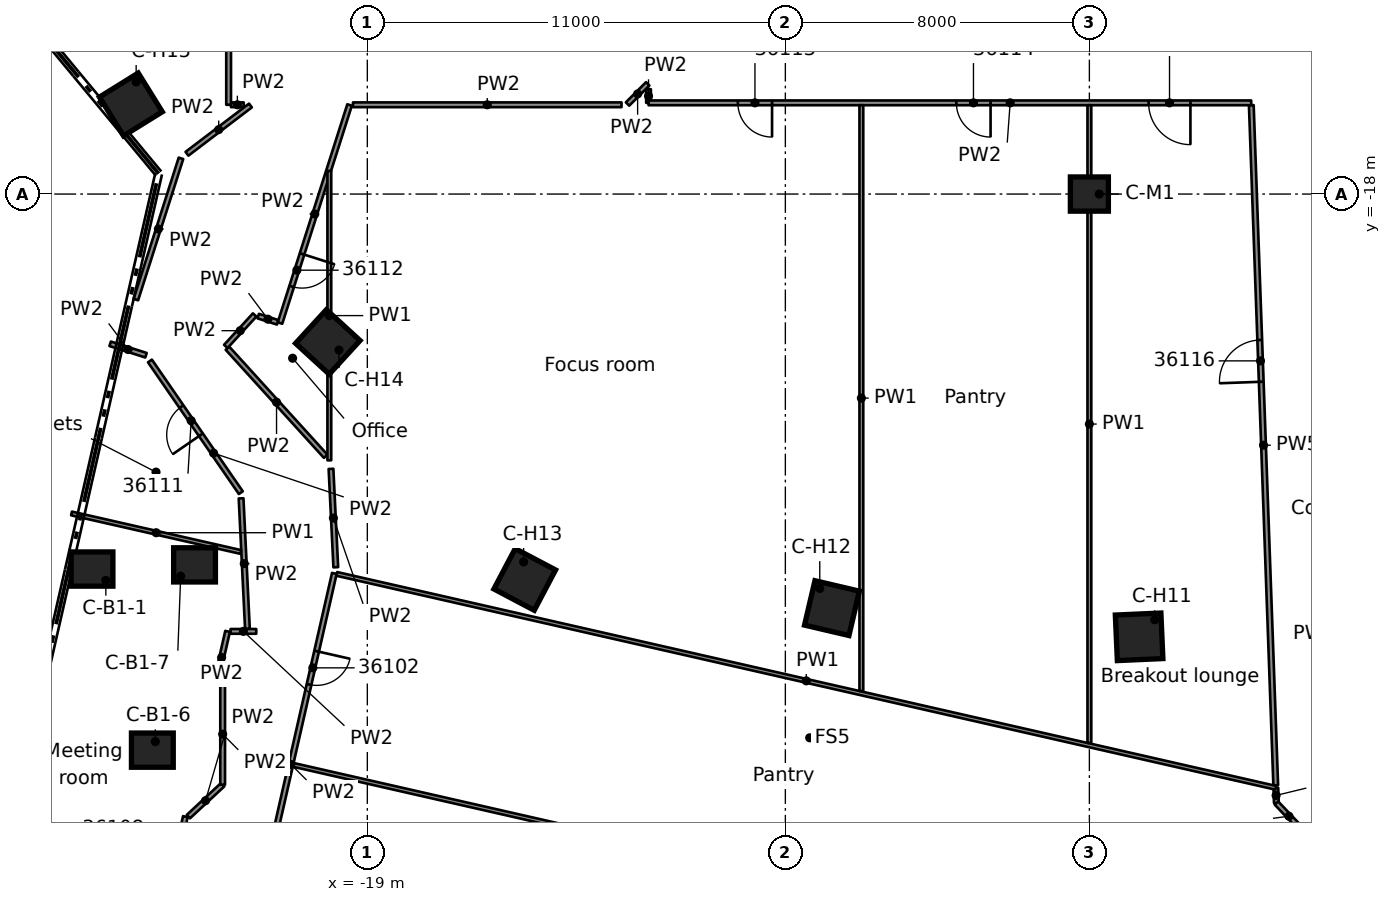
"""IFC4 building model, lengths in metres.
Left out: names, types, materials, properties, quantities, classifications, styles, units other than length and angle.
Written with IfcOpenShell. Run it as: python <this file> out.ifc"""

import sys

from ifc_helpers import new_model, si_unit, direction, frame, frame_2d, origin, origin_2d, place, context, subcontext, project, spatial, rectangle, extrude, element, fill, save


model = new_model("IFC4")
c1 = context("Model", 3, precision=1e-05, world=origin(), true_north=direction((0.0, 1.0)))
c2 = subcontext(c1, "Body", "Model", "MODEL_VIEW")
j1 = project(units=[si_unit("LENGTHUNIT", "METRE"), si_unit("PLANEANGLEUNIT", "RADIAN")], contexts=[c1])
p1 = place(None, origin())
s1 = spatial("IfcSite", under=j1, at=p1, CompositionType="ELEMENT")
p2 = place(p1, origin())
s2 = spatial("IfcBuilding", under=s1, at=p2, CompositionType="ELEMENT")
p3 = place(p2, frame((0.0, 0.0, 181.1)))
s3 = spatial("IfcBuildingStorey", under=s2, at=p3, CompositionType="ELEMENT", Elevation=181.1)
for number, where, z_axis, x_axis in (
    (1, (-26.245, -27.867, 0.0), (0.0, 0.0, 1.0), (1.0, 0.0, 0.0)),
    (2, (-24.657, -32.632, 0.0), (0.0, 0.0, 1.0), (1.0, 0.0, 0.0)),
    (3, (-23.547, -27.757, 0.0), (0.0, 0.0, 1.0), (1.0, 0.0, 0.0)),
):
    element("IfcColumn", number, at=place(p3, frame(where, z_axis=z_axis, x_axis=x_axis)), inside=s3, PredefinedType="COLUMN", context=c2, shape_type="SweptSolid", body=[
        extrude(rectangle(XDim=1.1, YDim=0.9, at=origin_2d()), origin(), (0.0, 0.0, 1.0), 3.5),
    ])
for number, where, z_axis, x_axis in (
    (4, (1.309, -29.65, 0.0), (0.0, 0.0, 1.0), (0.044, -0.999, 0.0)),
    (5, (-6.774, -28.895, 0.0), (0.0, 0.0, 1.0), (-0.228, -0.974, 0.0)),
    (6, (-14.858, -28.141, 0.0), (0.0, 0.0, 1.0), (-0.467, -0.884, 0.0)),
    (7, (-20.04, -21.891, 0.0), (0.0, 0.0, 1.0), (-0.675, -0.738, 0.0)),
    (8, (-25.222, -15.642, 0.0), (0.0, 0.0, 1.0), (-0.85, -0.527, 0.0)),
):
    element("IfcColumn", number, at=place(p3, frame(where, z_axis=z_axis, x_axis=x_axis)), inside=s3, PredefinedType="COLUMN", context=c2, shape_type="SweptSolid", body=[
        extrude(rectangle(XDim=1.2, YDim=1.2, at=origin_2d()), origin(), (0.0, 0.0, 1.0), 3.5),
    ])
p4 = place(p3, frame((0.0, -18.0, 0.0), z_axis=(0.0, 0.0, 1.0), x_axis=(1.0, 0.0, 0.0)))
e9 = element("IfcColumn", 9, at=p4, inside=s3, PredefinedType="COLUMN", context=c2, shape_type="SweptSolid", body=[
    extrude(rectangle(XDim=1.0, YDim=0.9, at=origin_2d()), origin(), (0.0, 0.0, 1.0), 3.5),
])
p5 = place(p3, frame((-11.601, -15.242, 0.0), z_axis=(0.0, 0.0, 1.0), x_axis=(0.002726642898, -0.999996282702, 0.0)))
e10 = element("IfcWall", 10, at=p5, inside=s3, PredefinedType="PARTITIONING", context=c2, shape_type="SweptSolid", body=[
    extrude(rectangle(XDim=0.358, YDim=0.125, at=frame_2d((0.179, 0.0))), origin(), (0.0, 0.0, 1.0), 3.06),
])
p6 = place(p3, frame((4.907, -33.623, 0.0), z_axis=(0.0, 0.0, 1.0), x_axis=(0.034692866757, -0.999398021309, 0.0)))
e11 = element("IfcWall", 11, at=p6, inside=s3, PredefinedType="PARTITIONING", context=c2, shape_type="SweptSolid", body=[
    extrude(rectangle(XDim=0.401, YDim=0.125, at=frame_2d((0.201, 0.0))), origin(), (0.0, 0.0, 1.0), 3.06),
])
p7 = place(p3, frame((4.904, -33.555, 0.0), z_axis=(0.0, 0.0, 1.0), x_axis=(-0.035916720211, 0.999354786454, 0.0)))
e12 = element("IfcWall", 12, at=p7, inside=s3, PredefinedType="PARTITIONING", context=c2, shape_type="SweptSolid", body=[
    extrude(rectangle(XDim=17.904, YDim=0.125, at=frame_2d((8.952, 0.0))), origin(), (0.0, 0.0, 1.0), 2.425),
])
p8 = place(p7, frame((10.623, 0.0, 0.0)))
e13 = element("IfcOpeningElement", 13, at=p8, cuts=e12, PredefinedType="OPENING", context=c2, shape_type="SweptSolid", body=[
    extrude(rectangle(XDim=1.1, YDim=2.1, at=frame_2d((0.55, 1.05))), frame((0.0, 0.073, 0.0), z_axis=(0.0, -1.0, 0.0), x_axis=(1.0, 0.0, 0.0)), (0.0, 0.0, 1.0), 0.145),
])
p9 = place(p3, frame((-22.322, -26.007, 0.0), z_axis=(0.0, 0.0, 1.0), x_axis=(0.048573949442, -0.998819589033, 0.0)))
e14 = element("IfcWall", 14, at=p9, inside=s3, PredefinedType="PARTITIONING", context=c2, shape_type="SweptSolid", body=[
    extrude(rectangle(XDim=3.438, YDim=0.125, at=frame_2d((1.719, 0.0))), origin(), (0.0, 0.0, 1.0), 3.06),
])
p10 = place(p3, frame((-19.956, -25.231, 0.0), z_axis=(0.0, 0.0, 1.0), x_axis=(0.048617095064, -0.998817489869, 0.0)))
e15 = element("IfcWall", 15, at=p10, inside=s3, PredefinedType="PARTITIONING", context=c2, shape_type="SweptSolid", body=[
    extrude(rectangle(XDim=2.591, YDim=0.125, at=frame_2d((1.296, 0.0))), origin(), (0.0, 0.0, 1.0), 3.06),
])
p11 = place(p3, frame((-22.329, -25.857, 0.0), z_axis=(0.0, 0.0, 1.0), x_axis=(-0.567945710046, 0.823066018276, 0.0)))
e16 = element("IfcWall", 16, at=p11, inside=s3, PredefinedType="PARTITIONING", context=c2, shape_type="SweptSolid", body=[
    extrude(rectangle(XDim=4.21, YDim=0.125, at=frame_2d((2.105, 0.0))), origin(), (0.0, 0.0, 1.0), 3.06),
])
p12 = place(p11, frame((1.85, 0.0, 0.0)))
e17 = element("IfcOpeningElement", 17, at=p12, cuts=e16, PredefinedType="OPENING", context=c2, shape_type="SweptSolid", body=[
    extrude(rectangle(XDim=0.9, YDim=2.1, at=frame_2d((0.45, 1.05))), frame((0.0, 0.073, 0.0), z_axis=(0.0, -1.0, 0.0), x_axis=(1.0, 0.0, 0.0)), (0.0, 0.0, 1.0), 0.145),
])
p13 = place(p3, frame((-20.096, -24.9, 0.0), z_axis=(0.0, 0.0, 1.0), x_axis=(-0.672615898584, 0.739991792503, 0.0)))
e18 = element("IfcWall", 18, at=p13, inside=s3, PredefinedType="PARTITIONING", context=c2, shape_type="SweptSolid", body=[
    extrude(rectangle(XDim=3.844, YDim=0.125, at=frame_2d((1.922, 0.0))), origin(), (0.0, 0.0, 1.0), 3.06),
])
p14 = place(p3, frame((-25.767, -21.94, 0.0), z_axis=(0.0, 0.0, 1.0), x_axis=(0.952650092138, -0.304068745433, 0.0)))
e19 = element("IfcWall", 19, at=p14, inside=s3, PredefinedType="PARTITIONING", context=c2, shape_type="SweptSolid", body=[
    extrude(rectangle(XDim=0.99, YDim=0.125, at=frame_2d((0.495, 0.0))), origin(), (0.0, 0.0, 1.0), 3.06),
])
p15 = place(p3, frame((-21.872, -21.211, 0.0), z_axis=(0.0, 0.0, 1.0), x_axis=(0.952508294333, -0.304512642146, 0.0)))
e20 = element("IfcWall", 20, at=p15, inside=s3, PredefinedType="PARTITIONING", context=c2, shape_type="SweptSolid", body=[
    extrude(rectangle(XDim=0.539, YDim=0.125, at=frame_2d((0.27, 0.0))), origin(), (0.0, 0.0, 1.0), 3.06),
])
p16 = place(p3, frame((-20.951, -33.019, 0.0), z_axis=(0.0, 0.0, 1.0), x_axis=(0.975025683381, -0.222092135715, 0.0)))
e21 = element("IfcWall", 21, at=p16, inside=s3, PredefinedType="PARTITIONING", context=c2, shape_type="SweptSolid", body=[
    extrude(rectangle(XDim=26.187, YDim=0.1, at=frame_2d((13.094, 0.0))), origin(), (0.0, 0.0, 1.0), 3.06),
])
p17 = place(p3, frame((-26.784, -26.404, 0.0), z_axis=(0.0, 0.0, 1.0), x_axis=(0.975064044209, -0.221923657346, 0.0)))
e22 = element("IfcWall", 22, at=p17, inside=s3, PredefinedType="PARTITIONING", context=c2, shape_type="SweptSolid", body=[
    extrude(rectangle(XDim=4.569, YDim=0.1, at=frame_2d((2.284, 0.0))), origin(), (0.0, 0.0, 1.0), 3.06),
])
p18 = place(p3, frame((-19.806, -27.994, 0.0), z_axis=(0.0, 0.0, 1.0), x_axis=(0.975023541408, -0.222101539165, 0.0)))
e23 = element("IfcWall", 23, at=p18, inside=s3, PredefinedType="PARTITIONING", context=c2, shape_type="SweptSolid", body=[
    extrude(rectangle(XDim=25.345, YDim=0.1, at=frame_2d((12.672, 0.0))), origin(), (0.0, 0.0, 1.0), 3.06),
])
p19 = place(p3, frame((-23.709, -34.381, 0.0), z_axis=(0.0, 0.0, 1.0), x_axis=(0.732207421562, 0.681081707147, 0.0)))
e24 = element("IfcWall", 24, at=p19, inside=s3, PredefinedType="PARTITIONING", context=c2, shape_type="SweptSolid", body=[
    extrude(rectangle(XDim=1.232, YDim=0.125, at=frame_2d((0.616, 0.0))), origin(), (0.0, 0.0, 1.0), 3.06),
])
p20 = place(p3, frame((-22.599, -29.507, 0.0), z_axis=(0.0, 0.0, 1.0), x_axis=(1.0, 0.0, 0.0)))
e25 = element("IfcWall", 25, at=p20, inside=s3, PredefinedType="PARTITIONING", context=c2, shape_type="SweptSolid", body=[
    extrude(rectangle(XDim=0.676, YDim=0.125, at=frame_2d((0.338, 0.0))), origin(), (0.0, 0.0, 1.0), 3.06),
])
p21 = place(p3, frame((-22.587, -15.651, 0.0), z_axis=(0.0, 0.0, 1.0), x_axis=(1.0, 0.0, 0.0)))
e26 = element("IfcWall", 26, at=p21, inside=s3, PredefinedType="PARTITIONING", context=c2, shape_type="SweptSolid", body=[
    extrude(rectangle(XDim=0.334, YDim=0.125, at=frame_2d((0.167, 0.0))), origin(), (0.0, 0.0, 1.0), 3.06),
])
p22 = place(p3, frame((-19.378, -15.651, 0.0), z_axis=(0.0, 0.0, 1.0), x_axis=(1.0, 0.0, 0.0)))
e27 = element("IfcWall", 27, at=p22, inside=s3, PredefinedType="PARTITIONING", context=c2, shape_type="SweptSolid", body=[
    extrude(rectangle(XDim=7.067, YDim=0.125, at=frame_2d((3.533, 0.0))), origin(), (0.0, 0.0, 1.0), 3.06),
])
p23 = place(p3, frame((4.259, -15.6, 0.0), z_axis=(0.0, 0.0, 1.0), x_axis=(-1.0, 0.0, 0.0)))
e28 = element("IfcWall", 28, at=p23, inside=s3, PredefinedType="PARTITIONING", context=c2, shape_type="SweptSolid", body=[
    extrude(rectangle(XDim=15.859, YDim=0.125, at=frame_2d((7.93, 0.0))), origin(), (0.0, 0.0, 1.0), 3.06),
])
p24 = place(p23, frame((12.609, 0.0, 0.0)))
e29 = element("IfcOpeningElement", 29, at=p24, cuts=e28, PredefinedType="OPENING", context=c2, shape_type="SweptSolid", body=[
    extrude(rectangle(XDim=0.9, YDim=2.1, at=frame_2d((0.45, 1.05))), frame((0.0, 0.073, 0.0), z_axis=(0.0, -1.0, 0.0), x_axis=(1.0, 0.0, 0.0)), (0.0, 0.0, 1.0), 0.145),
])
p25 = place(p23, frame((6.859, 0.0, 0.0)))
e30 = element("IfcOpeningElement", 30, at=p25, cuts=e28, PredefinedType="OPENING", context=c2, shape_type="SweptSolid", body=[
    extrude(rectangle(XDim=0.9, YDim=2.1, at=frame_2d((0.45, 1.05))), frame((0.0, 0.073, 0.0), z_axis=(0.0, -1.0, 0.0), x_axis=(1.0, 0.0, 0.0)), (0.0, 0.0, 1.0), 0.145),
])
p26 = place(p23, frame((1.6, 0.0, 0.0)))
e31 = element("IfcOpeningElement", 31, at=p26, cuts=e28, PredefinedType="OPENING", context=c2, shape_type="SweptSolid", body=[
    extrude(rectangle(XDim=1.1, YDim=2.1, at=frame_2d((0.55, 1.05))), frame((0.0, 0.073, 0.0), z_axis=(0.0, -1.0, 0.0), x_axis=(1.0, 0.0, 0.0)), (0.0, 0.0, 1.0), 0.145),
])
p27 = place(p3, frame((4.922, -34.024, 0.0), z_axis=(0.0, 0.0, 1.0), x_axis=(0.689011074604, -0.724750811709, 0.0)))
e32 = element("IfcWall", 32, at=p27, inside=s3, PredefinedType="PARTITIONING", context=c2, shape_type="SweptSolid", body=[
    extrude(rectangle(XDim=0.956, YDim=0.125, at=frame_2d((0.478, 0.0))), origin(), (0.0, 0.0, 1.0), 3.06),
])
p28 = place(p3, frame((-23.746, -16.94, 0.0), z_axis=(0.0, 0.0, 1.0), x_axis=(0.796002971308, 0.605292714039, 0.0)))
e33 = element("IfcWall", 33, at=p28, inside=s3, PredefinedType="PARTITIONING", context=c2, shape_type="SweptSolid", body=[
    extrude(rectangle(XDim=2.098, YDim=0.125, at=frame_2d((1.049, 0.0))), origin(), (0.0, 0.0, 1.0), 3.06),
])
p29 = place(p3, frame((-12.153, -15.631, 0.0), z_axis=(0.0, 0.0, 1.0), x_axis=(0.707106781187, 0.707106781187, 0.0)))
e34 = element("IfcWall", 34, at=p29, inside=s3, PredefinedType="PARTITIONING", context=c2, shape_type="SweptSolid", body=[
    extrude(rectangle(XDim=0.751, YDim=0.125, at=frame_2d((0.375, 0.0))), origin(), (0.0, 0.0, 1.0), 3.06),
])
p30 = place(p3, frame((-22.724, -22.009, 0.0), z_axis=(0.0, 0.0, 1.0), x_axis=(0.675685261753, 0.737190224467, 0.0)))
e35 = element("IfcWall", 35, at=p30, inside=s3, PredefinedType="PARTITIONING", context=c2, shape_type="SweptSolid", body=[
    extrude(rectangle(XDim=1.123, YDim=0.125, at=frame_2d((0.562, 0.0))), origin(), (0.0, 0.0, 1.0), 3.06),
])
p31 = place(p3, frame((-19.467, -15.656, 0.0), z_axis=(0.0, 0.0, 1.0), x_axis=(-0.304004951976, -0.952670451507, 0.0)))
e36 = element("IfcWall", 36, at=p31, inside=s3, PredefinedType="PARTITIONING", context=c2, shape_type="SweptSolid", body=[
    extrude(rectangle(XDim=6.023, YDim=0.125, at=frame_2d((3.012, 0.0))), origin(), (0.0, 0.0, 1.0), 3.06),
])
p32 = place(p31, frame((4.113, 0.0, 0.0)))
e37 = element("IfcOpeningElement", 37, at=p32, cuts=e36, PredefinedType="OPENING", context=c2, shape_type="SweptSolid", body=[
    extrude(rectangle(XDim=0.9, YDim=2.1, at=frame_2d((0.45, 1.05))), frame((0.0, 0.073, 0.0), z_axis=(0.0, -1.0, 0.0), x_axis=(1.0, 0.0, 0.0)), (0.0, 0.0, 1.0), 0.145),
])
p33 = place(p3, frame((-23.904, -17.06, 0.0), z_axis=(0.0, 0.0, 1.0), x_axis=(-0.304208106658, -0.952605599314, 0.0)))
e38 = element("IfcWall", 38, at=p33, inside=s3, PredefinedType="PARTITIONING", context=c2, shape_type="SweptSolid", body=[
    extrude(rectangle(XDim=3.902, YDim=0.125, at=frame_2d((1.951, 0.0))), origin(), (0.0, 0.0, 1.0), 3.06),
])
p34 = place(p3, frame((-19.868, -27.982, 0.0), z_axis=(0.0, 0.0, 1.0), x_axis=(-0.222050161604, -0.975035243328, 0.0)))
e39 = element("IfcWall", 39, at=p34, inside=s3, PredefinedType="PARTITIONING", context=c2, shape_type="SweptSolid", body=[
    extrude(rectangle(XDim=10.304, YDim=0.125, at=frame_2d((5.152, 0.0))), origin(), (0.0, 0.0, 1.0), 3.06),
])
p35 = place(p34, frame((2.098, 0.0, 0.0)))
e40 = element("IfcOpeningElement", 40, at=p35, cuts=e39, PredefinedType="OPENING", context=c2, shape_type="SweptSolid", body=[
    extrude(rectangle(XDim=0.9, YDim=2.1, at=frame_2d((0.45, 1.05))), frame((0.0, 0.073, 0.0), z_axis=(0.0, -1.0, 0.0), x_axis=(1.0, 0.0, 0.0)), (0.0, 0.0, 1.0), 0.145),
])
p36 = place(p34, frame((7.252, 0.0, 0.0)))
e41 = element("IfcOpeningElement", 41, at=p36, cuts=e39, PredefinedType="OPENING", context=c2, shape_type="SweptSolid", body=[
    extrude(rectangle(XDim=0.9, YDim=2.1, at=frame_2d((0.45, 1.05))), frame((0.0, 0.073, 0.0), z_axis=(0.0, -1.0, 0.0), x_axis=(1.0, 0.0, 0.0)), (0.0, 0.0, 1.0), 0.145),
])
p37 = place(p3, frame((-26.24, -45.148, 0.0), z_axis=(0.0, 0.0, 1.0), x_axis=(0.22206165199, 0.975032626488, 0.0)))
e42 = element("IfcWall", 42, at=p37, inside=s3, PredefinedType="PARTITIONING", context=c2, shape_type="SweptSolid", body=[
    extrude(rectangle(XDim=11.042, YDim=0.125, at=frame_2d((5.521, 0.0))), origin(), (0.0, 0.0, 1.0), 3.06),
])
p38 = place(p37, frame((8.949, 0.0, 0.0)))
e43 = element("IfcOpeningElement", 43, at=p38, cuts=e42, PredefinedType="OPENING", context=c2, shape_type="SweptSolid", body=[
    extrude(rectangle(XDim=0.9, YDim=2.1, at=frame_2d((0.45, 1.05))), frame((0.0, 0.073, 0.0), z_axis=(0.0, -1.0, 0.0), x_axis=(1.0, 0.0, 0.0)), (0.0, 0.0, 1.0), 0.145),
])
p39 = place(p37, frame((3.1, 0.0, 0.0)))
e44 = element("IfcOpeningElement", 44, at=p39, cuts=e42, PredefinedType="OPENING", context=c2, shape_type="SweptSolid", body=[
    extrude(rectangle(XDim=1.8, YDim=2.1, at=frame_2d((0.9, 1.05))), frame((0.0, 0.073, 0.0), z_axis=(0.0, -1.0, 0.0), x_axis=(1.0, 0.0, 0.0)), (0.0, 0.0, 1.0), 0.145),
])
p40 = place(p3, frame((-22.99, -30.882, 0.0), z_axis=(0.0, 0.0, 1.0), x_axis=(0.221950340639, 0.975057970733, 0.0)))
e45 = element("IfcWall", 45, at=p40, inside=s3, PredefinedType="PARTITIONING", context=c2, shape_type="SweptSolid", body=[
    extrude(rectangle(XDim=1.41, YDim=0.125, at=frame_2d((0.705, 0.0))), origin(), (0.0, 0.0, 1.0), 3.06),
])
p41 = place(p3, frame((0.0, -32.442, 0.0), z_axis=(0.0, 0.0, 1.0), x_axis=(0.0, 1.0, 0.0)))
e46 = element("IfcWall", 46, at=p41, inside=s3, PredefinedType="PARTITIONING", context=c2, shape_type="SweptSolid", body=[
    extrude(rectangle(XDim=16.78, YDim=0.1, at=frame_2d((8.39, 0.0))), origin(), (0.0, 0.0, 1.0), 3.06),
])
p42 = place(p3, frame((-6.0, -31.076, 0.0), z_axis=(0.0, 0.0, 1.0), x_axis=(0.0, 1.0, 0.0)))
e47 = element("IfcWall", 47, at=p42, inside=s3, PredefinedType="PARTITIONING", context=c2, shape_type="SweptSolid", body=[
    extrude(rectangle(XDim=15.414, YDim=0.1, at=frame_2d((7.707, 0.0))), origin(), (0.0, 0.0, 1.0), 3.06),
])
p43 = place(p3, frame((-20.0, -25.006, 0.0), z_axis=(0.0, 0.0, 1.0), x_axis=(0.0, 1.0, 0.0)))
e48 = element("IfcWall", 48, at=p43, inside=s3, PredefinedType="PARTITIONING", context=c2, shape_type="SweptSolid", body=[
    extrude(rectangle(XDim=7.616, YDim=0.1, at=frame_2d((3.808, 0.0))), origin(), (0.0, 0.0, 1.0), 3.06),
])
p44 = place(p3, frame((-22.65, -15.651, 0.0), z_axis=(0.0, 0.0, 1.0), x_axis=(0.0, 1.0, 0.0)))
e49 = element("IfcWall", 49, at=p44, inside=s3, PredefinedType="PARTITIONING", context=c2, shape_type="SweptSolid", body=[
    extrude(rectangle(XDim=31.302, YDim=0.125, at=frame_2d((15.651, 0.0))), origin(), (0.0, 0.0, 1.0), 3.06),
])
p45 = place(p44, frame((7.35, 0.0, 0.0)))
e50 = element("IfcOpeningElement", 50, at=p45, cuts=e49, PredefinedType="OPENING", context=c2, shape_type="SweptSolid", body=[
    extrude(rectangle(XDim=0.9, YDim=2.1, at=frame_2d((0.45, 1.05))), frame((0.0, 0.073, 0.0), z_axis=(0.0, -1.0, 0.0), x_axis=(1.0, 0.0, 0.0)), (0.0, 0.0, 1.0), 0.145),
])
p46 = place(p44, frame((22.501, 0.0, 0.0)))
e51 = element("IfcOpeningElement", 51, at=p46, cuts=e49, PredefinedType="OPENING", context=c2, shape_type="SweptSolid", body=[
    extrude(rectangle(XDim=1.8, YDim=2.1, at=frame_2d((0.9, 1.05))), frame((0.0, 0.073, 0.0), z_axis=(0.0, -1.0, 0.0), x_axis=(1.0, 0.0, 0.0)), (0.0, 0.0, 1.0), 0.145),
])
p47 = place(p3, frame((-22.807, -33.542, 0.0), z_axis=(0.0, 0.0, 1.0), x_axis=(0.0, 1.0, 0.0)))
e52 = element("IfcWall", 52, at=p47, inside=s3, PredefinedType="PARTITIONING", context=c2, shape_type="SweptSolid", body=[
    extrude(rectangle(XDim=2.66, YDim=0.125, at=frame_2d((1.33, 0.0))), origin(), (0.0, 0.0, 1.0), 3.06),
])
p48 = place(p35, origin())
e53 = element("IfcDoor", 53, at=p48, inside=s3, OperationType="SINGLE_SWING_LEFT", PredefinedType="DOOR", context=c2, shape_type="SweptSolid", body=[
    extrude(rectangle(XDim=0.9, YDim=2.1, at=frame_2d((0.45, 1.05))), frame((0.0, 0.025, 0.0), z_axis=(0.0, -1.0, 0.0), x_axis=(1.0, 0.0, 0.0)), (0.0, 0.0, 1.0), 0.05),
])
fill(e40, e53)
p49 = place(p12, origin())
e54 = element("IfcDoor", 54, at=p49, inside=s3, OperationType="SINGLE_SWING_RIGHT", PredefinedType="DOOR", context=c2, shape_type="SweptSolid", body=[
    extrude(rectangle(XDim=0.9, YDim=2.1, at=frame_2d((0.45, 1.05))), frame((0.0, 0.025, 0.0), z_axis=(0.0, -1.0, 0.0), x_axis=(1.0, 0.0, 0.0)), (0.0, 0.0, 1.0), 0.05),
])
fill(e17, e54)
p50 = place(p32, origin())
e55 = element("IfcDoor", 55, at=p50, inside=s3, OperationType="SINGLE_SWING_RIGHT", PredefinedType="DOOR", context=c2, shape_type="SweptSolid", body=[
    extrude(rectangle(XDim=0.9, YDim=2.1, at=frame_2d((0.45, 1.05))), frame((0.0, 0.025, 0.0), z_axis=(0.0, -1.0, 0.0), x_axis=(1.0, 0.0, 0.0)), (0.0, 0.0, 1.0), 0.05),
])
fill(e37, e55)
p51 = place(p24, origin())
e56 = element("IfcDoor", 56, at=p51, inside=s3, OperationType="SINGLE_SWING_RIGHT", PredefinedType="DOOR", context=c2, shape_type="SweptSolid", body=[
    extrude(rectangle(XDim=0.9, YDim=2.1, at=frame_2d((0.45, 1.05))), frame((0.0, 0.025, 0.0), z_axis=(0.0, -1.0, 0.0), x_axis=(1.0, 0.0, 0.0)), (0.0, 0.0, 1.0), 0.05),
])
fill(e29, e56)
p52 = place(p25, origin())
e57 = element("IfcDoor", 57, at=p52, inside=s3, OperationType="SINGLE_SWING_LEFT", PredefinedType="DOOR", context=c2, shape_type="SweptSolid", body=[
    extrude(rectangle(XDim=0.9, YDim=2.1, at=frame_2d((0.45, 1.05))), frame((0.0, 0.025, 0.0), z_axis=(0.0, -1.0, 0.0), x_axis=(1.0, 0.0, 0.0)), (0.0, 0.0, 1.0), 0.05),
])
fill(e30, e57)
p53 = place(p26, origin())
e58 = element("IfcDoor", 58, at=p53, inside=s3, OperationType="SINGLE_SWING_LEFT", PredefinedType="DOOR", context=c2, shape_type="SweptSolid", body=[
    extrude(rectangle(XDim=1.1, YDim=2.1, at=frame_2d((0.55, 1.05))), frame((0.0, 0.025, 0.0), z_axis=(0.0, -1.0, 0.0), x_axis=(1.0, 0.0, 0.0)), (0.0, 0.0, 1.0), 0.05),
])
fill(e31, e58)
p54 = place(p8, origin())
e59 = element("IfcDoor", 59, at=p54, inside=s3, OperationType="SINGLE_SWING_RIGHT", PredefinedType="DOOR", context=c2, shape_type="SweptSolid", body=[
    extrude(rectangle(XDim=1.1, YDim=2.1, at=frame_2d((0.55, 1.05))), frame((0.0, 0.025, 0.0), z_axis=(0.0, -1.0, 0.0), x_axis=(1.0, 0.0, 0.0)), (0.0, 0.0, 1.0), 0.05),
])
fill(e13, e59)
save(model, sys.argv[1])
